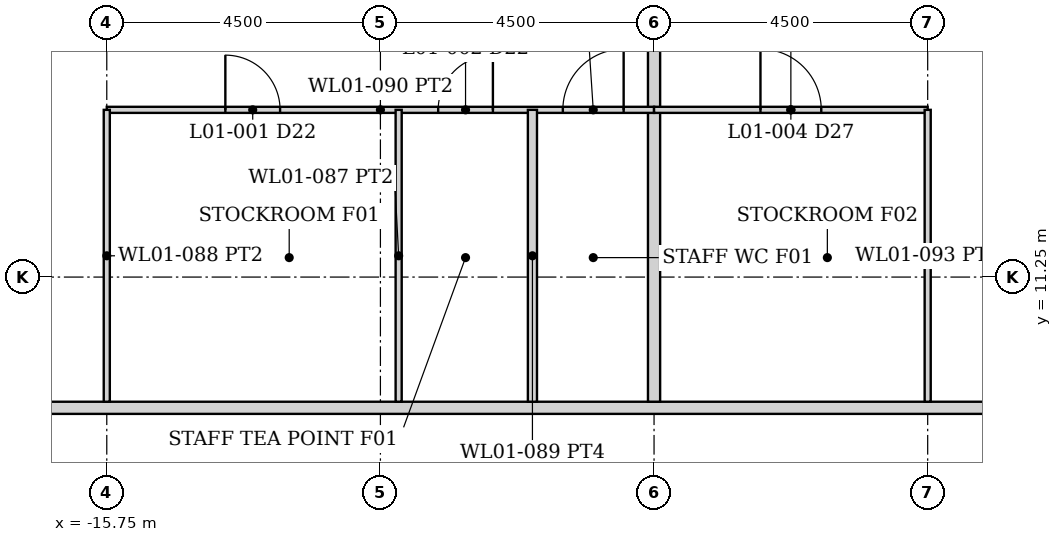
"""IFC4 building model, lengths in metres.
Left out: names, types, materials, properties, quantities, classifications, styles, units other than length and angle.
Written with IfcOpenShell. Run it as: python <this file> out.ifc"""

import sys

from ifc_helpers import new_model, si_unit, direction, frame, frame_2d, origin, place, context, subcontext, project, spatial, rectangle, extrude, element, fill, save


model = new_model("IFC4")
c1 = context("Model", 3, precision=1e-05, world=origin(), true_north=direction((0.0, 1.0)))
c2 = subcontext(c1, "Body", "Model", "MODEL_VIEW")
j1 = project(units=[si_unit("LENGTHUNIT", "METRE"), si_unit("PLANEANGLEUNIT", "RADIAN")], contexts=[c1])
p1 = place(None, origin())
s1 = spatial("IfcSite", under=j1, at=p1, CompositionType="ELEMENT")
p2 = place(p1, origin())
s2 = spatial("IfcBuilding", under=s1, at=p2, CompositionType="ELEMENT")
p3 = place(p2, frame((0.0, 0.0, 6.0)))
s3 = spatial("IfcBuildingStorey", under=s2, at=p3, CompositionType="ELEMENT", Elevation=6.0)
p4 = place(p3, frame((-25.075, 9.1, 0.0), z_axis=(0.0, 0.0, 1.0), x_axis=(1.0, 0.0, 0.0)))
e1 = element("IfcWall", 1, at=p4, inside=s3, PredefinedType="PARTITIONING", context=c2, shape_type="SweptSolid", body=[
    extrude(rectangle(XDim=50.15, YDim=0.2, at=frame_2d((25.075, 0.0))), origin(), (0.0, 0.0, 1.0), 3.829),
])
p5 = place(p4, frame((6.85, 0.0, 0.0)))
e2 = element("IfcOpeningElement", 2, at=p5, cuts=e1, PredefinedType="OPENING", context=c2, shape_type="SweptSolid", body=[
    extrude(rectangle(XDim=0.9, YDim=2.1, at=frame_2d((0.45, 1.05))), frame((0.0, 0.11, 0.0), z_axis=(0.0, -1.0, 0.0), x_axis=(1.0, 0.0, 0.0)), (0.0, 0.0, 1.0), 0.22),
])
p6 = place(p4, frame((24.625, 0.0, 0.0)))
e3 = element("IfcOpeningElement", 3, at=p6, cuts=e1, PredefinedType="OPENING", context=c2, shape_type="SweptSolid", body=[
    extrude(rectangle(XDim=0.9, YDim=2.1, at=frame_2d((0.45, 1.05))), frame((0.0, 0.11, 0.0), z_axis=(0.0, -1.0, 0.0), x_axis=(1.0, 0.0, 0.0)), (0.0, 0.0, 1.0), 0.22),
])
p7 = place(p4, frame((42.4, 0.0, 0.0)))
e4 = element("IfcOpeningElement", 4, at=p7, cuts=e1, PredefinedType="OPENING", context=c2, shape_type="SweptSolid", body=[
    extrude(rectangle(XDim=0.9, YDim=2.1, at=frame_2d((0.45, 1.05))), frame((0.0, 0.11, 0.0), z_axis=(0.0, -1.0, 0.0), x_axis=(1.0, 0.0, 0.0)), (0.0, 0.0, 1.0), 0.22),
])
p8 = place(p3, frame((-6.75, 9.2, 0.0), z_axis=(0.0, 0.0, 1.0), x_axis=(0.0, 1.0, 0.0)))
e5 = element("IfcWall", 5, at=p8, inside=s3, PredefinedType="PARTITIONING", context=c2, shape_type="SweptSolid", body=[
    extrude(rectangle(XDim=19.889, YDim=0.2, at=frame_2d((9.944, 0.0))), origin(), (0.0, 0.0, 1.0), 3.829),
])
p9 = place(p3, frame((-15.75, 14.0, 0.0), z_axis=(0.0, 0.0, 1.0), x_axis=(1.0, 0.0, 0.0)))
e6 = element("IfcWall", 6, at=p9, inside=s3, PredefinedType="PARTITIONING", context=c2, shape_type="SweptSolid", body=[
    extrude(rectangle(XDim=9.0, YDim=0.1, at=frame_2d((4.5, 0.0))), origin(), (0.0, 0.0, 1.0), 3.829),
])
p10 = place(p9, frame((1.95, 0.0, 0.0)))
e7 = element("IfcOpeningElement", 7, at=p10, cuts=e6, PredefinedType="OPENING", context=c2, shape_type="SweptSolid", body=[
    extrude(rectangle(XDim=0.9, YDim=2.1, at=frame_2d((0.45, 1.05))), frame((0.0, 0.06, 0.0), z_axis=(0.0, -1.0, 0.0), x_axis=(1.0, 0.0, 0.0)), (0.0, 0.0, 1.0), 0.12),
])
p11 = place(p9, frame((5.45, 0.0, 0.0)))
e8 = element("IfcOpeningElement", 8, at=p11, cuts=e6, PredefinedType="OPENING", context=c2, shape_type="SweptSolid", body=[
    extrude(rectangle(XDim=0.9, YDim=2.1, at=frame_2d((0.45, 1.05))), frame((0.0, 0.06, 0.0), z_axis=(0.0, -1.0, 0.0), x_axis=(1.0, 0.0, 0.0)), (0.0, 0.0, 1.0), 0.12),
])
p12 = place(p9, frame((7.5, 0.0, 0.0)))
e9 = element("IfcOpeningElement", 9, at=p12, cuts=e6, PredefinedType="OPENING", context=c2, shape_type="SweptSolid", body=[
    extrude(rectangle(XDim=1.0, YDim=2.1, at=frame_2d((0.5, 1.05))), frame((0.0, 0.06, 0.0), z_axis=(0.0, -1.0, 0.0), x_axis=(1.0, 0.0, 0.0)), (0.0, 0.0, 1.0), 0.12),
])
for number, where, z_axis, x_axis in (
    (10, (-15.75, 9.2, 0.0), (0.0, 0.0, 1.0), (0.0, 1.0, 0.0)),
    (11, (-10.95, 9.2, 0.0), (0.0, 0.0, 1.0), (0.0, 1.0, 0.0)),
):
    element("IfcWall", number, at=place(p3, frame(where, z_axis=z_axis, x_axis=x_axis)), inside=s3, PredefinedType="PARTITIONING", context=c2, shape_type="SweptSolid", body=[
        extrude(rectangle(XDim=4.8, YDim=0.1, at=frame_2d((2.4, 0.0))), origin(), (0.0, 0.0, 1.0), 3.829),
    ])
p13 = place(p3, frame((-8.75, 9.2, 0.0), z_axis=(0.0, 0.0, 1.0), x_axis=(0.0, 1.0, 0.0)))
e12 = element("IfcWall", 12, at=p13, inside=s3, PredefinedType="PARTITIONING", context=c2, shape_type="SweptSolid", body=[
    extrude(rectangle(XDim=4.8, YDim=0.15, at=frame_2d((2.4, 0.0))), origin(), (0.0, 0.0, 1.0), 3.829),
])
p14 = place(p3, frame((-6.75, 14.0, 0.0), z_axis=(0.0, 0.0, 1.0), x_axis=(1.0, 0.0, 0.0)))
e13 = element("IfcWall", 13, at=p14, inside=s3, PredefinedType="PARTITIONING", context=c2, shape_type="SweptSolid", body=[
    extrude(rectangle(XDim=4.5, YDim=0.1, at=frame_2d((2.25, 0.0))), origin(), (0.0, 0.0, 1.0), 3.829),
])
p15 = place(p14, frame((1.75, 0.0, 0.0)))
e14 = element("IfcOpeningElement", 14, at=p15, cuts=e13, PredefinedType="OPENING", context=c2, shape_type="SweptSolid", body=[
    extrude(rectangle(XDim=1.0, YDim=2.1, at=frame_2d((0.5, 1.05))), frame((0.0, 0.06, 0.0), z_axis=(0.0, -1.0, 0.0), x_axis=(1.0, 0.0, 0.0)), (0.0, 0.0, 1.0), 0.12),
])
p16 = place(p3, frame((-2.25, 9.2, 0.0), z_axis=(0.0, 0.0, 1.0), x_axis=(0.0, 1.0, 0.0)))
e15 = element("IfcWall", 15, at=p16, inside=s3, PredefinedType="PARTITIONING", context=c2, shape_type="SweptSolid", body=[
    extrude(rectangle(XDim=4.8, YDim=0.1, at=frame_2d((2.4, 0.0))), origin(), (0.0, 0.0, 1.0), 3.829),
])
p17 = place(p10, origin())
e16 = element("IfcDoor", 16, at=p17, inside=s3, OperationType="SINGLE_SWING_LEFT", PredefinedType="DOOR", context=c2, shape_type="SweptSolid", body=[
    extrude(rectangle(XDim=0.9, YDim=2.1, at=frame_2d((0.45, 1.05))), frame((0.0, 0.025, 0.0), z_axis=(0.0, -1.0, 0.0), x_axis=(1.0, 0.0, 0.0)), (0.0, 0.0, 1.0), 0.05),
])
fill(e7, e16)
p18 = place(p11, origin())
e17 = element("IfcDoor", 17, at=p18, inside=s3, OperationType="SINGLE_SWING_RIGHT", PredefinedType="DOOR", context=c2, shape_type="SweptSolid", body=[
    extrude(rectangle(XDim=0.9, YDim=2.1, at=frame_2d((0.45, 1.05))), frame((0.0, 0.025, 0.0), z_axis=(0.0, -1.0, 0.0), x_axis=(1.0, 0.0, 0.0)), (0.0, 0.0, 1.0), 0.05),
])
fill(e8, e17)
p19 = place(p12, origin())
e18 = element("IfcDoor", 18, at=p19, inside=s3, OperationType="SINGLE_SWING_RIGHT", PredefinedType="DOOR", context=c2, shape_type="SweptSolid", body=[
    extrude(rectangle(XDim=1.0, YDim=2.1, at=frame_2d((0.5, 1.05))), frame((0.0, 0.025, 0.0), z_axis=(0.0, -1.0, 0.0), x_axis=(1.0, 0.0, 0.0)), (0.0, 0.0, 1.0), 0.05),
])
fill(e9, e18)
p20 = place(p15, origin())
e19 = element("IfcDoor", 19, at=p20, inside=s3, OperationType="SINGLE_SWING_LEFT", PredefinedType="DOOR", context=c2, shape_type="SweptSolid", body=[
    extrude(rectangle(XDim=1.0, YDim=2.1, at=frame_2d((0.5, 1.05))), frame((0.0, 0.025, 0.0), z_axis=(0.0, -1.0, 0.0), x_axis=(1.0, 0.0, 0.0)), (0.0, 0.0, 1.0), 0.05),
])
fill(e14, e19)
save(model, sys.argv[1])
